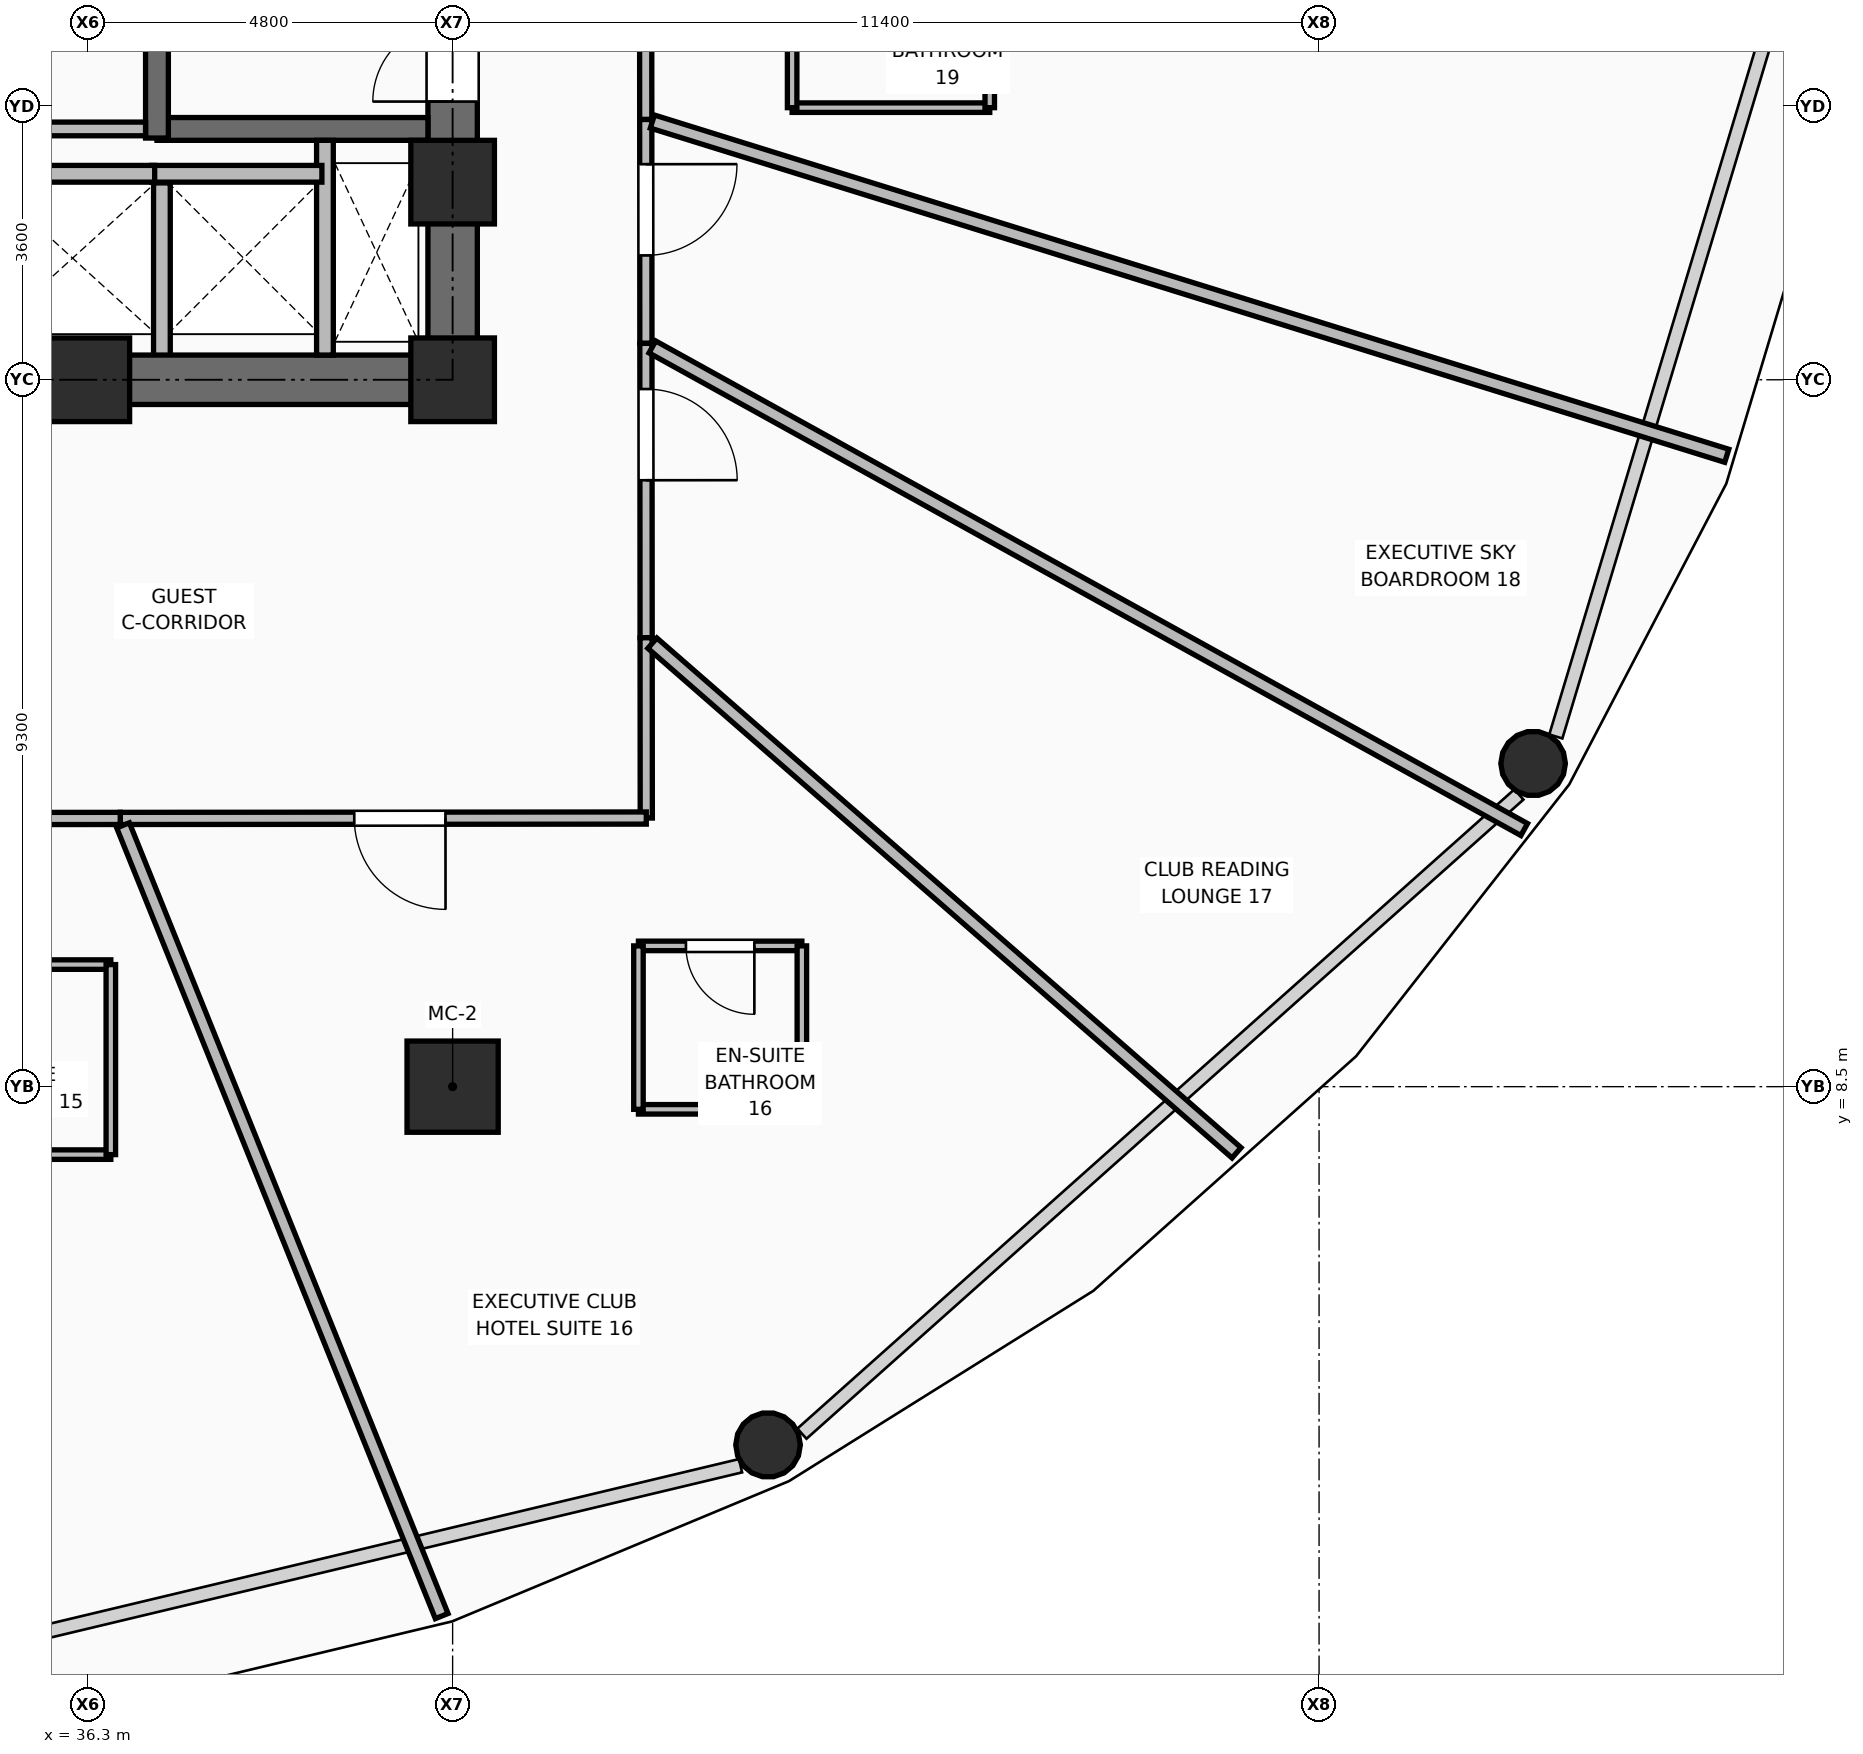
"""IFC4 building model, lengths in metres.
Left out: names, types, materials, properties, quantities, classifications, styles, units other than length and angle.
Written with IfcOpenShell. Run it as: python <this file> out.ifc"""

import sys

from ifc_helpers import new_model, si_unit, direction, frame, frame_2d, origin, origin_2d, place, context, subcontext, project, spatial, rectangle, hollow_rectangle, hollow_circle, extrude, element, fill, save


model = new_model("IFC4")
c1 = context("Model", 3, precision=1e-05, world=origin(), true_north=direction((0.0, 1.0)))
c2 = subcontext(c1, "Body", "Model", "MODEL_VIEW")
j1 = project(units=[si_unit("LENGTHUNIT", "METRE"), si_unit("PLANEANGLEUNIT", "RADIAN")], contexts=[c1])
p1 = place(None, origin())
s1 = spatial("IfcSite", under=j1, at=p1, CompositionType="ELEMENT")
p2 = place(p1, origin())
s2 = spatial("IfcBuilding", under=s1, at=p2, CompositionType="ELEMENT")
p3 = place(p2, frame((0.0, 0.0, 83.25)))
s3 = spatial("IfcBuildingStorey", under=s2, at=p3, CompositionType="ELEMENT", Elevation=83.25)
for number, where, z_axis, x_axis in (
    (1, (36.3, 17.8, 0.0), (0.0, 0.0, 1.0), (1.0, 0.0, 0.0)),
    (2, (41.1, 17.8, 0.0), (0.0, 0.0, 1.0), (1.0, 0.0, 0.0)),
    (3, (41.1, 20.4, 0.0), (0.0, 0.0, 1.0), (1.0, 0.0, 0.0)),
):
    element("IfcColumn", number, at=place(p3, frame(where, z_axis=z_axis, x_axis=x_axis)), inside=s3, PredefinedType="COLUMN", context=c2, shape_type="SweptSolid", body=[
        extrude(rectangle(XDim=1.1, YDim=1.1, at=origin_2d()), origin(), (0.0, 0.0, 1.0), 3.75),
    ])
p4 = place(p3, frame((41.1, 8.5, 0.0), z_axis=(0.0, 0.0, 1.0), x_axis=(1.0, 0.0, 0.0)))
e4 = element("IfcColumn", 4, at=p4, inside=s3, PredefinedType="COLUMN", context=c2, shape_type="SweptSolid", body=[
    extrude(hollow_rectangle(XDim=1.2, YDim=1.2, WallThickness=0.045, at=origin_2d()), origin(), (0.0, 0.0, 1.0), 3.75),
])
for number, where, z_axis, x_axis in (
    (5, (45.25, 3.787, 0.0), (0.0, 0.0, 1.0), (1.0, 0.0, 0.0)),
    (6, (55.316, 12.752, 0.0), (0.0, 0.0, 1.0), (1.0, 0.0, 0.0)),
):
    element("IfcColumn", number, at=place(p3, frame(where, z_axis=z_axis, x_axis=x_axis)), inside=s3, PredefinedType="COLUMN", context=c2, shape_type="SweptSolid", body=[
        extrude(hollow_circle(Radius=0.425, WallThickness=0.04, at=origin_2d()), origin(), (0.0, 0.0, 1.0), 3.57),
    ])
p5 = place(p3, frame((37.275, 18.08, 0.0), z_axis=(0.0, 0.0, 1.0), x_axis=(0.0, 1.0, 0.0)))
e7 = element("IfcWall", 7, at=p5, inside=s3, PredefinedType="PARTITIONING", context=c2, shape_type="SweptSolid", body=[
    extrude(rectangle(XDim=2.31, YDim=0.22, at=frame_2d((1.155, 0.0))), origin(), (0.0, 0.0, 1.0), 3.545),
])
p6 = place(p3, frame((34.95, 17.8, 0.0), z_axis=(0.0, 0.0, 1.0), x_axis=(1.0, 0.0, 0.0)))
e8 = element("IfcWall", 8, at=p6, inside=s3, PredefinedType="SHEAR", context=c2, shape_type="SweptSolid", body=[
    extrude(rectangle(XDim=6.475, YDim=0.65, at=frame_2d((3.238, 0.0))), origin(), (0.0, 0.0, 1.0), 3.57),
])
p7 = place(p3, frame((41.1, 18.125, 0.0), z_axis=(0.0, 0.0, 1.0), x_axis=(0.0, 1.0, 0.0)))
e9 = element("IfcWall", 9, at=p7, inside=s3, PredefinedType="SHEAR", context=c2, shape_type="SweptSolid", body=[
    extrude(rectangle(XDim=14.0, YDim=0.65, at=frame_2d((7.0, 0.0))), origin(), (0.0, 0.0, 1.0), 3.57),
])
p8 = place(p7, frame((3.335, 0.0, 0.0)))
e10 = element("IfcOpeningElement", 10, at=p8, cuts=e9, PredefinedType="OPENING", context=c2, shape_type="SweptSolid", body=[
    extrude(rectangle(XDim=1.05, YDim=2.1, at=frame_2d((0.525, 1.05))), frame((0.0, 0.335, 0.0), z_axis=(0.0, -1.0, 0.0), x_axis=(1.0, 0.0, 0.0)), (0.0, 0.0, 1.0), 0.67),
])
p9 = place(p3, frame((37.21, 21.1, 0.0), z_axis=(0.0, 0.0, 1.0), x_axis=(1.0, 0.0, 0.0)))
e11 = element("IfcWall", 11, at=p9, inside=s3, PredefinedType="SHEAR", context=c2, shape_type="SweptSolid", body=[
    extrude(rectangle(XDim=3.565, YDim=0.3, at=frame_2d((1.782, 0.0))), origin(), (0.0, 0.0, 1.0), 3.57),
])
p10 = place(p3, frame((37.21, 20.98, 0.0), z_axis=(0.0, 0.0, 1.0), x_axis=(0.0, 1.0, 0.0)))
e12 = element("IfcWall", 12, at=p10, inside=s3, PredefinedType="SHEAR", context=c2, shape_type="SweptSolid", body=[
    extrude(rectangle(XDim=7.99, YDim=0.3, at=frame_2d((3.995, 0.0))), origin(), (0.0, 0.0, 1.0), 3.57),
])
p11 = place(p3, frame((39.42, 18.125, 0.0), z_axis=(0.0, 0.0, 1.0), x_axis=(0.0, 1.0, 0.0)))
e13 = element("IfcWall", 13, at=p11, inside=s3, PredefinedType="PARTITIONING", context=c2, shape_type="SweptSolid", body=[
    extrude(rectangle(XDim=2.825, YDim=0.22, at=frame_2d((1.413, 0.0))), origin(), (0.0, 0.0, 1.0), 3.55),
])
for number, where, z_axis, x_axis in (
    (14, (37.14, 20.51, 0.0), (0.0, 0.0, 1.0), (1.0, 0.0, 0.0)),
    (15, (34.94, 20.51, 0.0), (0.0, 0.0, 1.0), (1.0, 0.0, 0.0)),
):
    element("IfcWall", number, at=place(p3, frame(where, z_axis=z_axis, x_axis=x_axis)), inside=s3, PredefinedType="PARTITIONING", context=c2, shape_type="SweptSolid", body=[
        extrude(rectangle(XDim=2.24, YDim=0.22, at=frame_2d((1.12, 0.0))), origin(), (0.0, 0.0, 1.0), 3.55),
    ])
p12 = place(p3, frame((34.98, 21.1, 0.0), z_axis=(0.0, 0.0, 1.0), x_axis=(1.0, 0.0, 0.0)))
e16 = element("IfcWall", 16, at=p12, inside=s3, PredefinedType="PARTITIONING", context=c2, shape_type="SweptSolid", body=[
    extrude(rectangle(XDim=2.08, YDim=0.18, at=frame_2d((1.04, 0.0))), origin(), (0.0, 0.0, 1.0), 3.55),
])
p13 = place(p3, frame((43.638, 26.152, 0.0), z_axis=(0.0, 0.0, 1.0), x_axis=(0.000644042472, -0.999999792605, 0.0)))
e17 = element("IfcWall", 17, at=p13, inside=s3, PredefinedType="PARTITIONING", context=c2, shape_type="SweptSolid", body=[
    extrude(rectangle(XDim=4.928, YDim=0.16, at=frame_2d((2.464, 0.0))), origin(), (0.0, 0.0, 1.0), 2.928),
])
p14 = place(p13, frame((1.79, 0.0, 0.0)))
e18 = element("IfcOpeningElement", 18, at=p14, cuts=e17, PredefinedType="OPENING", context=c2, shape_type="SweptSolid", body=[
    extrude(rectangle(XDim=1.2, YDim=2.1, at=frame_2d((0.6, 1.05))), frame((0.0, 0.09, 0.0), z_axis=(0.0, -1.0, 0.0), x_axis=(1.0, 0.0, 0.0)), (0.0, 0.0, 1.0), 0.18),
])
p15 = place(p3, frame((43.641, 21.224, 0.0), z_axis=(0.0, 0.0, 1.0), x_axis=(0.0006631848, -0.999999780093, 0.0)))
e19 = element("IfcWall", 19, at=p15, inside=s3, PredefinedType="PARTITIONING", context=c2, shape_type="SweptSolid", body=[
    extrude(rectangle(XDim=2.945, YDim=0.16, at=frame_2d((1.473, 0.0))), origin(), (0.0, 0.0, 1.0), 2.928),
])
p16 = place(p15, frame((0.588, 0.0, 0.0)))
e20 = element("IfcOpeningElement", 20, at=p16, cuts=e19, PredefinedType="OPENING", context=c2, shape_type="SweptSolid", body=[
    extrude(rectangle(XDim=1.2, YDim=2.1, at=frame_2d((0.6, 1.05))), frame((0.0, 0.09, 0.0), z_axis=(0.0, -1.0, 0.0), x_axis=(1.0, 0.0, 0.0)), (0.0, 0.0, 1.0), 0.18),
])
p17 = place(p3, frame((43.643, 18.279, 0.0), z_axis=(0.0, 0.0, 1.0), x_axis=(0.000756429436, -0.999999713907, 0.0)))
e21 = element("IfcWall", 21, at=p17, inside=s3, PredefinedType="PARTITIONING", context=c2, shape_type="SweptSolid", body=[
    extrude(rectangle(XDim=3.873, YDim=0.16, at=frame_2d((1.937, 0.0))), origin(), (0.0, 0.0, 1.0), 2.928),
])
p18 = place(p17, frame((0.601, 0.0, 0.0)))
e22 = element("IfcOpeningElement", 22, at=p18, cuts=e21, PredefinedType="OPENING", context=c2, shape_type="SweptSolid", body=[
    extrude(rectangle(XDim=1.2, YDim=2.1, at=frame_2d((0.6, 1.05))), frame((0.0, 0.09, 0.0), z_axis=(0.0, -1.0, 0.0), x_axis=(1.0, 0.0, 0.0)), (0.0, 0.0, 1.0), 0.18),
])
p19 = place(p3, frame((43.646, 14.406, 0.0), z_axis=(0.0, 0.0, 1.0), x_axis=(0.00082338383, -0.999999661019, 0.0)))
e23 = element("IfcWall", 23, at=p19, inside=s3, PredefinedType="PARTITIONING", context=c2, shape_type="SweptSolid", body=[
    extrude(rectangle(XDim=2.372, YDim=0.16, at=frame_2d((1.186, 0.0))), origin(), (0.0, 0.0, 1.0), 3.55),
])
p20 = place(p3, frame((43.648, 12.034, 0.0), z_axis=(0.0, 0.0, 1.0), x_axis=(-0.999999751123, -0.000705516968, 0.0)))
e24 = element("IfcWall", 24, at=p20, inside=s3, PredefinedType="PARTITIONING", context=c2, shape_type="SweptSolid", body=[
    extrude(rectangle(XDim=6.921, YDim=0.16, at=frame_2d((3.46, 0.0))), origin(), (0.0, 0.0, 1.0), 2.928),
])
p21 = place(p20, frame((2.642, 0.0, 0.0)))
e25 = element("IfcOpeningElement", 25, at=p21, cuts=e24, PredefinedType="OPENING", context=c2, shape_type="SweptSolid", body=[
    extrude(rectangle(XDim=1.2, YDim=2.1, at=frame_2d((0.6, 1.05))), frame((0.0, 0.09, 0.0), z_axis=(0.0, -1.0, 0.0), x_axis=(1.0, 0.0, 0.0)), (0.0, 0.0, 1.0), 0.18),
])
p22 = place(p3, frame((36.727, 12.029, 0.0), z_axis=(0.0, 0.0, 1.0), x_axis=(-0.999999710434, -0.000761007209, 0.0)))
e26 = element("IfcWall", 26, at=p22, inside=s3, PredefinedType="PARTITIONING", context=c2, shape_type="SweptSolid", body=[
    extrude(rectangle(XDim=6.737, YDim=0.16, at=frame_2d((3.369, 0.0))), origin(), (0.0, 0.0, 1.0), 2.928),
])
p23 = place(p22, frame((2.843, 0.0, 0.0)))
e27 = element("IfcOpeningElement", 27, at=p23, cuts=e26, PredefinedType="OPENING", context=c2, shape_type="SweptSolid", body=[
    extrude(rectangle(XDim=1.2, YDim=2.1, at=frame_2d((0.6, 1.05))), frame((0.0, 0.09, 0.0), z_axis=(0.0, -1.0, 0.0), x_axis=(1.0, 0.0, 0.0)), (0.0, 0.0, 1.0), 0.18),
])
p24 = place(p3, frame((36.764, 11.938, 0.0), z_axis=(0.0, 0.0, 1.0), x_axis=(0.373765091029, -0.927523399558, 0.0)))
e28 = element("IfcWall", 28, at=p24, inside=s3, PredefinedType="PARTITIONING", context=c2, shape_type="SweptSolid", body=[
    extrude(rectangle(XDim=11.216, YDim=0.18, at=frame_2d((5.608, 0.0))), origin(), (0.0, 0.0, 1.0), 2.775),
])
p25 = place(p3, frame((43.728, 14.335, 0.0), z_axis=(0.0, 0.0, 1.0), x_axis=(0.753557452015, -0.657382055211, 0.0)))
e29 = element("IfcWall", 29, at=p25, inside=s3, PredefinedType="PARTITIONING", context=c2, shape_type="SweptSolid", body=[
    extrude(rectangle(XDim=10.2, YDim=0.18, at=frame_2d((5.1, 0.0))), origin(), (0.0, 0.0, 1.0), 2.775),
])
p26 = place(p3, frame((43.728, 18.232, 0.0), z_axis=(0.0, 0.0, 1.0), x_axis=(0.874929134989, -0.484250977022, 0.0)))
e30 = element("IfcWall", 30, at=p26, inside=s3, PredefinedType="PARTITIONING", context=c2, shape_type="SweptSolid", body=[
    extrude(rectangle(XDim=13.111, YDim=0.18, at=frame_2d((6.555, 0.0))), origin(), (0.0, 0.0, 1.0), 2.775),
])
p27 = place(p3, frame((43.728, 21.197, 0.0), z_axis=(0.0, 0.0, 1.0), x_axis=(0.954873823144, -0.297011753766, 0.0)))
e31 = element("IfcWall", 31, at=p27, inside=s3, PredefinedType="PARTITIONING", context=c2, shape_type="SweptSolid", body=[
    extrude(rectangle(XDim=14.804, YDim=0.18, at=frame_2d((7.402, 0.0))), origin(), (0.0, 0.0, 1.0), 2.775),
])
p28 = place(p3, frame((34.003, 7.606, 0.0), z_axis=(0.0, 0.0, 1.0), x_axis=(1.0, 0.0, 0.0)))
e32 = element("IfcWall", 32, at=p28, inside=s3, PredefinedType="PARTITIONING", context=c2, shape_type="SweptSolid", body=[
    extrude(rectangle(XDim=2.6, YDim=0.125, at=frame_2d((1.3, 0.0))), origin(), (0.0, 0.0, 1.0), 3.55),
])
p29 = place(p3, frame((34.003, 10.106, 0.0), z_axis=(0.0, 0.0, 1.0), x_axis=(1.0, 0.0, 0.0)))
e33 = element("IfcWall", 33, at=p29, inside=s3, PredefinedType="PARTITIONING", context=c2, shape_type="SweptSolid", body=[
    extrude(rectangle(XDim=2.6, YDim=0.125, at=frame_2d((1.3, 0.0))), origin(), (0.0, 0.0, 1.0), 3.55),
])
p30 = place(p29, frame((0.85, 0.0, 0.0)))
e34 = element("IfcOpeningElement", 34, at=p30, cuts=e33, PredefinedType="OPENING", context=c2, shape_type="SweptSolid", body=[
    extrude(rectangle(XDim=0.9, YDim=2.1, at=frame_2d((0.45, 1.05))), frame((0.0, 0.073, 0.0), z_axis=(0.0, -1.0, 0.0), x_axis=(1.0, 0.0, 0.0)), (0.0, 0.0, 1.0), 0.145),
])
p31 = place(p3, frame((36.603, 7.606, 0.0), z_axis=(0.0, 0.0, 1.0), x_axis=(0.0, 1.0, 0.0)))
e35 = element("IfcWall", 35, at=p31, inside=s3, PredefinedType="PARTITIONING", context=c2, shape_type="SweptSolid", body=[
    extrude(rectangle(XDim=2.5, YDim=0.125, at=frame_2d((1.25, 0.0))), origin(), (0.0, 0.0, 1.0), 3.55),
])
p32 = place(p3, frame((43.545, 8.202, 0.0), z_axis=(0.0, 0.0, 1.0), x_axis=(1.0, 0.0, 0.0)))
e36 = element("IfcWall", 36, at=p32, inside=s3, PredefinedType="PARTITIONING", context=c2, shape_type="SweptSolid", body=[
    extrude(rectangle(XDim=2.15, YDim=0.125, at=frame_2d((1.075, 0.0))), origin(), (0.0, 0.0, 1.0), 2.928),
])
p33 = place(p3, frame((43.545, 10.352, 0.0), z_axis=(0.0, 0.0, 1.0), x_axis=(1.0, 0.0, 0.0)))
e37 = element("IfcWall", 37, at=p33, inside=s3, PredefinedType="PARTITIONING", context=c2, shape_type="SweptSolid", body=[
    extrude(rectangle(XDim=2.15, YDim=0.125, at=frame_2d((1.075, 0.0))), origin(), (0.0, 0.0, 1.0), 2.928),
])
p34 = place(p33, frame((0.625, 0.0, 0.0)))
e38 = element("IfcOpeningElement", 38, at=p34, cuts=e37, PredefinedType="OPENING", context=c2, shape_type="SweptSolid", body=[
    extrude(rectangle(XDim=0.9, YDim=2.1, at=frame_2d((0.45, 1.05))), frame((0.0, 0.073, 0.0), z_axis=(0.0, -1.0, 0.0), x_axis=(1.0, 0.0, 0.0)), (0.0, 0.0, 1.0), 0.145),
])
p35 = place(p3, frame((43.545, 8.202, 0.0), z_axis=(0.0, 0.0, 1.0), x_axis=(0.0, 1.0, 0.0)))
e39 = element("IfcWall", 39, at=p35, inside=s3, PredefinedType="PARTITIONING", context=c2, shape_type="SweptSolid", body=[
    extrude(rectangle(XDim=2.15, YDim=0.125, at=frame_2d((1.075, 0.0))), origin(), (0.0, 0.0, 1.0), 2.928),
])
p36 = place(p3, frame((45.695, 8.202, 0.0), z_axis=(0.0, 0.0, 1.0), x_axis=(0.0, 1.0, 0.0)))
e40 = element("IfcWall", 40, at=p36, inside=s3, PredefinedType="PARTITIONING", context=c2, shape_type="SweptSolid", body=[
    extrude(rectangle(XDim=2.15, YDim=0.125, at=frame_2d((1.075, 0.0))), origin(), (0.0, 0.0, 1.0), 3.55),
])
p37 = place(p3, frame((45.567, 21.38, 0.0), z_axis=(0.0, 0.0, 1.0), x_axis=(1.0, 0.0, 0.0)))
e41 = element("IfcWall", 41, at=p37, inside=s3, PredefinedType="PARTITIONING", context=c2, shape_type="SweptSolid", body=[
    extrude(rectangle(XDim=2.6, YDim=0.125, at=frame_2d((1.3, 0.0))), origin(), (0.0, 0.0, 1.0), 2.928),
])
p38 = place(p3, frame((45.567, 21.38, 0.0), z_axis=(0.0, 0.0, 1.0), x_axis=(0.0, 1.0, 0.0)))
e42 = element("IfcWall", 42, at=p38, inside=s3, PredefinedType="PARTITIONING", context=c2, shape_type="SweptSolid", body=[
    extrude(rectangle(XDim=2.5, YDim=0.125, at=frame_2d((1.25, 0.0))), origin(), (0.0, 0.0, 1.0), 2.928),
])
p39 = place(p38, frame((0.8, 0.0, 0.0)))
e43 = element("IfcOpeningElement", 43, at=p39, cuts=e42, PredefinedType="OPENING", context=c2, shape_type="SweptSolid", body=[
    extrude(rectangle(XDim=0.9, YDim=2.1, at=frame_2d((0.45, 1.05))), frame((0.0, 0.073, 0.0), z_axis=(0.0, -1.0, 0.0), x_axis=(1.0, 0.0, 0.0)), (0.0, 0.0, 1.0), 0.145),
])
p40 = place(p3, frame((48.167, 21.38, 0.0), z_axis=(0.0, 0.0, 1.0), x_axis=(0.0, 1.0, 0.0)))
e44 = element("IfcWall", 44, at=p40, inside=s3, PredefinedType="PARTITIONING", context=c2, shape_type="SweptSolid", body=[
    extrude(rectangle(XDim=2.5, YDim=0.125, at=frame_2d((1.25, 0.0))), origin(), (0.0, 0.0, 1.0), 2.928),
])
p41 = place(p8, origin())
e45 = element("IfcDoor", 45, at=p41, inside=s3, OperationType="SINGLE_SWING_LEFT", PredefinedType="DOOR", context=c2, shape_type="SweptSolid", body=[
    extrude(rectangle(XDim=1.05, YDim=2.1, at=frame_2d((0.525, 1.05))), frame((0.0, 0.025, 0.0), z_axis=(0.0, -1.0, 0.0), x_axis=(1.0, 0.0, 0.0)), (0.0, 0.0, 1.0), 0.05),
])
fill(e10, e45)
p42 = place(p34, frame((0.9, 0.0, 0.0), z_axis=(0.0, 0.0, 1.0), x_axis=(-1.0, 0.0, 0.0)))
e46 = element("IfcDoor", 46, at=p42, inside=s3, OperationType="SINGLE_SWING_LEFT", PredefinedType="DOOR", context=c2, shape_type="SweptSolid", body=[
    extrude(rectangle(XDim=0.9, YDim=2.1, at=frame_2d((0.45, 1.05))), frame((0.0, 0.025, 0.0), z_axis=(0.0, -1.0, 0.0), x_axis=(1.0, 0.0, 0.0)), (0.0, 0.0, 1.0), 0.05),
])
fill(e38, e46)
p43 = place(p21, origin())
e47 = element("IfcDoor", 47, at=p43, inside=s3, OperationType="SINGLE_SWING_LEFT", PredefinedType="DOOR", context=c2, shape_type="SweptSolid", body=[
    extrude(rectangle(XDim=1.2, YDim=2.1, at=frame_2d((0.6, 1.05))), frame((0.0, 0.025, 0.0), z_axis=(0.0, -1.0, 0.0), x_axis=(1.0, 0.0, 0.0)), (0.0, 0.0, 1.0), 0.05),
])
fill(e25, e47)
p44 = place(p18, origin())
e48 = element("IfcDoor", 48, at=p44, inside=s3, OperationType="SINGLE_SWING_RIGHT", PredefinedType="DOOR", context=c2, shape_type="SweptSolid", body=[
    extrude(rectangle(XDim=1.2, YDim=2.1, at=frame_2d((0.6, 1.05))), frame((0.0, 0.025, 0.0), z_axis=(0.0, -1.0, 0.0), x_axis=(1.0, 0.0, 0.0)), (0.0, 0.0, 1.0), 0.05),
])
fill(e22, e48)
p45 = place(p16, origin())
e49 = element("IfcDoor", 49, at=p45, inside=s3, OperationType="SINGLE_SWING_LEFT", PredefinedType="DOOR", context=c2, shape_type="SweptSolid", body=[
    extrude(rectangle(XDim=1.2, YDim=2.1, at=frame_2d((0.6, 1.05))), frame((0.0, 0.025, 0.0), z_axis=(0.0, -1.0, 0.0), x_axis=(1.0, 0.0, 0.0)), (0.0, 0.0, 1.0), 0.05),
])
fill(e20, e49)
save(model, sys.argv[1])
